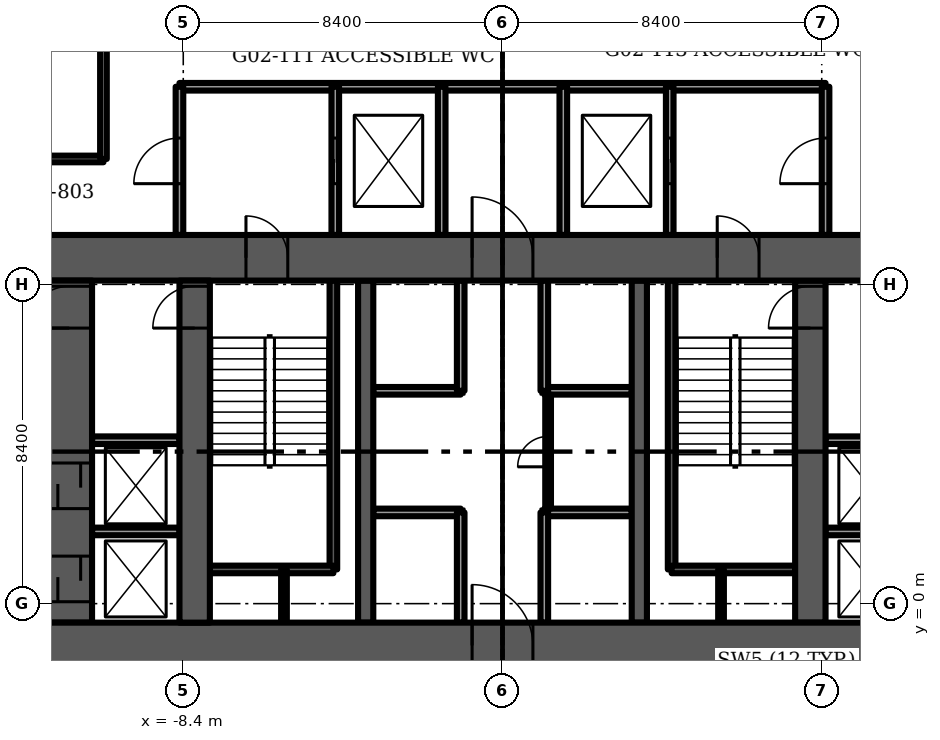
"""IFC4 building model, lengths in metres.
Left out: names, types, materials, properties, quantities, classifications, styles, units other than length and angle.
Written with IfcOpenShell. Run it as: python <this file> out.ifc"""

import sys

from ifc_helpers import new_model, si_unit, direction, frame, frame_2d, origin, place, context, subcontext, project, spatial, rectangle, extrude, element, fill, save


model = new_model("IFC4")
c1 = context("Model", 3, precision=1e-05, world=origin(), true_north=direction((0.0, 1.0)))
c2 = subcontext(c1, "Body", "Model", "MODEL_VIEW")
j1 = project(units=[si_unit("LENGTHUNIT", "METRE"), si_unit("PLANEANGLEUNIT", "RADIAN")], contexts=[c1])
p1 = place(None, origin())
s1 = spatial("IfcSite", under=j1, at=p1, CompositionType="ELEMENT")
p2 = place(p1, origin())
s2 = spatial("IfcBuilding", under=s1, at=p2, CompositionType="ELEMENT")
p3 = place(p2, frame((0.0, 0.0, 10.0)))
s3 = spatial("IfcBuildingStorey", under=s2, at=p3, CompositionType="ELEMENT", Elevation=10.0)
p4 = place(p3, frame((-12.0, -1.1, -0.3), z_axis=(0.0, 0.0, 1.0), x_axis=(1.0, 0.0, 0.0)))
e1 = element("IfcWall", 1, at=p4, inside=s3, PredefinedType="SHEAR", context=c2, shape_type="SweptSolid", body=[
    extrude(rectangle(XDim=24.0, YDim=1.2, at=frame_2d((12.0, 0.0))), origin(), (0.0, 0.0, 1.0), 4.5),
])
p5 = place(p4, frame((11.2, 0.0, 0.0)))
e2 = element("IfcOpeningElement", 2, at=p5, cuts=e1, PredefinedType="OPENING", context=c2, shape_type="SweptSolid", body=[
    extrude(rectangle(XDim=1.6, YDim=2.1, at=frame_2d((0.8, 1.05))), frame((0.0, 0.6, 0.0), z_axis=(0.0, -1.0, 0.0), x_axis=(1.0, 0.0, 0.0)), (0.0, 0.0, 1.0), 1.2),
])
p6 = place(p3, frame((-12.0, 9.1, -0.3), z_axis=(0.0, 0.0, 1.0), x_axis=(1.0, 0.0, 0.0)))
e3 = element("IfcWall", 3, at=p6, inside=s3, PredefinedType="SHEAR", context=c2, shape_type="SweptSolid", body=[
    extrude(rectangle(XDim=24.0, YDim=1.2, at=frame_2d((12.0, 0.0))), origin(), (0.0, 0.0, 1.0), 4.5),
])
p7 = place(p6, frame((11.2, 0.0, 0.0)))
e4 = element("IfcOpeningElement", 4, at=p7, cuts=e3, PredefinedType="OPENING", context=c2, shape_type="SweptSolid", body=[
    extrude(rectangle(XDim=1.6, YDim=2.1, at=frame_2d((0.8, 1.05))), frame((0.0, 0.6, 0.0), z_axis=(0.0, -1.0, 0.0), x_axis=(1.0, 0.0, 0.0)), (0.0, 0.0, 1.0), 1.2),
])
p8 = place(p6, frame((5.25, 0.0, 0.0)))
e5 = element("IfcOpeningElement", 5, at=p8, cuts=e3, PredefinedType="OPENING", context=c2, shape_type="SweptSolid", body=[
    extrude(rectangle(XDim=1.1, YDim=2.1, at=frame_2d((0.55, 1.05))), frame((0.0, 0.6, 0.0), z_axis=(0.0, -1.0, 0.0), x_axis=(1.0, 0.0, 0.0)), (0.0, 0.0, 1.0), 1.2),
])
p9 = place(p6, frame((17.65, 0.0, 0.0)))
e6 = element("IfcOpeningElement", 6, at=p9, cuts=e3, PredefinedType="OPENING", context=c2, shape_type="SweptSolid", body=[
    extrude(rectangle(XDim=1.1, YDim=2.1, at=frame_2d((0.55, 1.05))), frame((0.0, 0.6, 0.0), z_axis=(0.0, -1.0, 0.0), x_axis=(1.0, 0.0, 0.0)), (0.0, 0.0, 1.0), 1.2),
])
p10 = place(p3, frame((-8.1, -0.5, -0.3), z_axis=(0.0, 0.0, 1.0), x_axis=(0.0, 1.0, 0.0)))
e7 = element("IfcWall", 7, at=p10, inside=s3, PredefinedType="SHEAR", context=c2, shape_type="SweptSolid", body=[
    extrude(rectangle(XDim=9.0, YDim=0.8, at=frame_2d((4.5, 0.0))), origin(), (0.0, 0.0, 1.0), 4.5),
])
p11 = place(p10, frame((7.75, 0.0, 0.0)))
e8 = element("IfcOpeningElement", 8, at=p11, cuts=e7, PredefinedType="OPENING", context=c2, shape_type="SweptSolid", body=[
    extrude(rectangle(XDim=1.1, YDim=2.1, at=frame_2d((0.55, 1.05))), frame((0.0, 0.4, 0.0), z_axis=(0.0, -1.0, 0.0), x_axis=(1.0, 0.0, 0.0)), (0.0, 0.0, 1.0), 0.8),
])
p12 = place(p3, frame((8.1, -0.5, -0.3), z_axis=(0.0, 0.0, 1.0), x_axis=(0.0, 1.0, 0.0)))
e9 = element("IfcWall", 9, at=p12, inside=s3, PredefinedType="SHEAR", context=c2, shape_type="SweptSolid", body=[
    extrude(rectangle(XDim=9.0, YDim=0.8, at=frame_2d((4.5, 0.0))), origin(), (0.0, 0.0, 1.0), 4.5),
])
p13 = place(p12, frame((7.75, 0.0, 0.0)))
e10 = element("IfcOpeningElement", 10, at=p13, cuts=e9, PredefinedType="OPENING", context=c2, shape_type="SweptSolid", body=[
    extrude(rectangle(XDim=1.1, YDim=2.1, at=frame_2d((0.55, 1.05))), frame((0.0, 0.4, 0.0), z_axis=(0.0, -1.0, 0.0), x_axis=(1.0, 0.0, 0.0)), (0.0, 0.0, 1.0), 0.8),
])
for number, where, z_axis, x_axis in (
    (11, (-3.6, -0.5, -0.3), (0.0, 0.0, 1.0), (0.0, 1.0, 0.0)),
    (12, (3.6, -0.5, -0.3), (0.0, 0.0, 1.0), (0.0, 1.0, 0.0)),
):
    element("IfcWall", number, at=place(p3, frame(where, z_axis=z_axis, x_axis=x_axis)), inside=s3, PredefinedType="SHEAR", context=c2, shape_type="SweptSolid", body=[
        extrude(rectangle(XDim=9.0, YDim=0.4, at=frame_2d((4.5, 0.0))), origin(), (0.0, 0.0, 1.0), 4.5),
    ])
p14 = place(p3, frame((-11.4, -0.5, -0.3), z_axis=(0.0, 0.0, 1.0), x_axis=(0.0, 1.0, 0.0)))
e13 = element("IfcWall", 13, at=p14, inside=s3, PredefinedType="SHEAR", context=c2, shape_type="SweptSolid", body=[
    extrude(rectangle(XDim=9.0, YDim=1.2, at=frame_2d((4.5, 0.0))), origin(), (0.0, 0.0, 1.0), 4.5),
])
p15 = place(p14, frame((7.75, 0.0, 0.0)))
e14 = element("IfcOpeningElement", 14, at=p15, cuts=e13, PredefinedType="OPENING", context=c2, shape_type="SweptSolid", body=[
    extrude(rectangle(XDim=1.1, YDim=2.1, at=frame_2d((0.55, 1.05))), frame((0.0, 0.6, 0.0), z_axis=(0.0, -1.0, 0.0), x_axis=(1.0, 0.0, 0.0)), (0.0, 0.0, 1.0), 1.2),
])
p16 = place(p14, frame((0.55, 0.0, 0.0)))
e15 = element("IfcOpeningElement", 15, at=p16, cuts=e13, PredefinedType="OPENING", context=c2, shape_type="SweptSolid", body=[
    extrude(rectangle(XDim=1.2, YDim=2.1, at=frame_2d((0.6, 1.05))), frame((0.0, 0.6, 0.0), z_axis=(0.0, -1.0, 0.0), x_axis=(1.0, 0.0, 0.0)), (0.0, 0.0, 1.0), 1.2),
])
p17 = place(p14, frame((3.0, 0.0, 0.0)))
e16 = element("IfcOpeningElement", 16, at=p17, cuts=e13, PredefinedType="OPENING", context=c2, shape_type="SweptSolid", body=[
    extrude(rectangle(XDim=1.2, YDim=2.1, at=frame_2d((0.6, 1.05))), frame((0.0, 0.6, 0.0), z_axis=(0.0, -1.0, 0.0), x_axis=(1.0, 0.0, 0.0)), (0.0, 0.0, 1.0), 1.2),
])
for number, where, z_axis, x_axis in (
    (17, (-3.4, 2.4, 0.0), (0.0, 0.0, 1.0), (1.0, 0.0, 0.0)),
    (18, (-3.4, 5.6, 0.0), (0.0, 0.0, 1.0), (1.0, 0.0, 0.0)),
    (19, (1.1, 2.4, 0.0), (0.0, 0.0, 1.0), (1.0, 0.0, 0.0)),
    (20, (1.1, 5.6, 0.0), (0.0, 0.0, 1.0), (1.0, 0.0, 0.0)),
):
    element("IfcWall", number, at=place(p3, frame(where, z_axis=z_axis, x_axis=x_axis)), inside=s3, PredefinedType="PARTITIONING", context=c2, shape_type="SweptSolid", body=[
        extrude(rectangle(XDim=2.3, YDim=0.2, at=frame_2d((1.15, 0.0))), origin(), (0.0, 0.0, 1.0), 4.2),
    ])
for number, where, z_axis, x_axis in (
    (21, (-1.1, -0.5, 0.0), (0.0, 0.0, 1.0), (0.0, 1.0, 0.0)),
    (22, (1.1, -0.5, 0.0), (0.0, 0.0, 1.0), (0.0, 1.0, 0.0)),
    (23, (-1.1, 5.6, 0.0), (0.0, 0.0, 1.0), (0.0, 1.0, 0.0)),
    (24, (1.1, 5.6, 0.0), (0.0, 0.0, 1.0), (0.0, 1.0, 0.0)),
):
    element("IfcWall", number, at=place(p3, frame(where, z_axis=z_axis, x_axis=x_axis)), inside=s3, PredefinedType="PARTITIONING", context=c2, shape_type="SweptSolid", body=[
        extrude(rectangle(XDim=2.9, YDim=0.2, at=frame_2d((1.45, 0.0))), origin(), (0.0, 0.0, 1.0), 4.2),
    ])
p18 = place(p3, frame((-4.45, 0.9, -0.3), z_axis=(0.0, 0.0, 1.0), x_axis=(0.0, 1.0, 0.0)))
e25 = element("IfcWall", 25, at=p18, inside=s3, PredefinedType="SOLIDWALL", context=c2, shape_type="SweptSolid", body=[
    extrude(rectangle(XDim=7.6, YDim=0.2, at=frame_2d((3.8, 0.0))), origin(), (0.0, 0.0, 1.0), 4.5),
])
p19 = place(p3, frame((-7.7, 0.9, -0.3), z_axis=(0.0, 0.0, 1.0), x_axis=(1.0, 0.0, 0.0)))
e26 = element("IfcWall", 26, at=p19, inside=s3, PredefinedType="SOLIDWALL", context=c2, shape_type="SweptSolid", body=[
    extrude(rectangle(XDim=3.25, YDim=0.2, at=frame_2d((1.625, 0.0))), origin(), (0.0, 0.0, 1.0), 4.5),
])
p20 = place(p3, frame((-5.75, -0.5, 0.0), z_axis=(0.0, 0.0, 1.0), x_axis=(0.0, 1.0, 0.0)))
e27 = element("IfcWall", 27, at=p20, inside=s3, PredefinedType="PARTITIONING", context=c2, shape_type="SweptSolid", body=[
    extrude(rectangle(XDim=1.4, YDim=0.15, at=frame_2d((0.7, 0.0))), origin(), (0.0, 0.0, 1.0), 4.2),
])
p21 = place(p3, frame((4.45, 0.9, -0.3), z_axis=(0.0, 0.0, 1.0), x_axis=(0.0, 1.0, 0.0)))
e28 = element("IfcWall", 28, at=p21, inside=s3, PredefinedType="SOLIDWALL", context=c2, shape_type="SweptSolid", body=[
    extrude(rectangle(XDim=7.6, YDim=0.2, at=frame_2d((3.8, 0.0))), origin(), (0.0, 0.0, 1.0), 4.5),
])
p22 = place(p3, frame((4.45, 0.9, -0.3), z_axis=(0.0, 0.0, 1.0), x_axis=(1.0, 0.0, 0.0)))
e29 = element("IfcWall", 29, at=p22, inside=s3, PredefinedType="SOLIDWALL", context=c2, shape_type="SweptSolid", body=[
    extrude(rectangle(XDim=3.25, YDim=0.2, at=frame_2d((1.625, 0.0))), origin(), (0.0, 0.0, 1.0), 4.5),
])
p23 = place(p3, frame((5.75, -0.5, 0.0), z_axis=(0.0, 0.0, 1.0), x_axis=(0.0, 1.0, 0.0)))
e30 = element("IfcWall", 30, at=p23, inside=s3, PredefinedType="PARTITIONING", context=c2, shape_type="SweptSolid", body=[
    extrude(rectangle(XDim=1.4, YDim=0.15, at=frame_2d((0.7, 0.0))), origin(), (0.0, 0.0, 1.0), 4.2),
])
p24 = place(p3, frame((-8.5, 13.6, 0.0), z_axis=(0.0, 0.0, 1.0), x_axis=(1.0, 0.0, 0.0)))
e31 = element("IfcWall", 31, at=p24, inside=s3, PredefinedType="PARTITIONING", context=c2, shape_type="SweptSolid", body=[
    extrude(rectangle(XDim=17.0, YDim=0.2, at=frame_2d((8.5, 0.0))), origin(), (0.0, 0.0, 1.0), 4.2),
])
p25 = place(p3, frame((-8.5, 9.7, 0.0), z_axis=(0.0, 0.0, 1.0), x_axis=(0.0, 1.0, 0.0)))
e32 = element("IfcWall", 32, at=p25, inside=s3, PredefinedType="PARTITIONING", context=c2, shape_type="SweptSolid", body=[
    extrude(rectangle(XDim=3.9, YDim=0.2, at=frame_2d((1.95, 0.0))), origin(), (0.0, 0.0, 1.0), 4.2),
])
p26 = place(p25, frame((1.35, 0.0, 0.0)))
e33 = element("IfcOpeningElement", 33, at=p26, cuts=e32, PredefinedType="OPENING", context=c2, shape_type="SweptSolid", body=[
    extrude(rectangle(XDim=1.2, YDim=2.1, at=frame_2d((0.6, 1.05))), frame((0.0, 0.1, 0.0), z_axis=(0.0, -1.0, 0.0), x_axis=(1.0, 0.0, 0.0)), (0.0, 0.0, 1.0), 0.2),
])
p27 = place(p3, frame((8.5, 9.7, 0.0), z_axis=(0.0, 0.0, 1.0), x_axis=(0.0, 1.0, 0.0)))
e34 = element("IfcWall", 34, at=p27, inside=s3, PredefinedType="PARTITIONING", context=c2, shape_type="SweptSolid", body=[
    extrude(rectangle(XDim=3.9, YDim=0.2, at=frame_2d((1.95, 0.0))), origin(), (0.0, 0.0, 1.0), 4.2),
])
p28 = place(p27, frame((1.35, 0.0, 0.0)))
e35 = element("IfcOpeningElement", 35, at=p28, cuts=e34, PredefinedType="OPENING", context=c2, shape_type="SweptSolid", body=[
    extrude(rectangle(XDim=1.2, YDim=2.1, at=frame_2d((0.6, 1.05))), frame((0.0, 0.1, 0.0), z_axis=(0.0, -1.0, 0.0), x_axis=(1.0, 0.0, 0.0)), (0.0, 0.0, 1.0), 0.2),
])
p29 = place(p3, frame((-4.4, 9.7, 0.0), z_axis=(0.0, 0.0, 1.0), x_axis=(0.0, 1.0, 0.0)))
e36 = element("IfcWall", 36, at=p29, inside=s3, PredefinedType="PARTITIONING", context=c2, shape_type="SweptSolid", body=[
    extrude(rectangle(XDim=3.9, YDim=0.2, at=frame_2d((1.95, 0.0))), origin(), (0.0, 0.0, 1.0), 4.2),
])
p30 = place(p29, frame((1.35, 0.0, 0.0)))
e37 = element("IfcOpeningElement", 37, at=p30, cuts=e36, PredefinedType="OPENING", context=c2, shape_type="SweptSolid", body=[
    extrude(rectangle(XDim=1.2, YDim=2.1, at=frame_2d((0.6, 1.05))), frame((0.0, 0.1, 0.0), z_axis=(0.0, -1.0, 0.0), x_axis=(1.0, 0.0, 0.0)), (0.0, 0.0, 1.0), 0.2),
])
p31 = place(p3, frame((4.4, 9.7, 0.0), z_axis=(0.0, 0.0, 1.0), x_axis=(0.0, 1.0, 0.0)))
e38 = element("IfcWall", 38, at=p31, inside=s3, PredefinedType="PARTITIONING", context=c2, shape_type="SweptSolid", body=[
    extrude(rectangle(XDim=3.9, YDim=0.2, at=frame_2d((1.95, 0.0))), origin(), (0.0, 0.0, 1.0), 4.2),
])
p32 = place(p31, frame((1.35, 0.0, 0.0)))
e39 = element("IfcOpeningElement", 39, at=p32, cuts=e38, PredefinedType="OPENING", context=c2, shape_type="SweptSolid", body=[
    extrude(rectangle(XDim=1.2, YDim=2.1, at=frame_2d((0.6, 1.05))), frame((0.0, 0.1, 0.0), z_axis=(0.0, -1.0, 0.0), x_axis=(1.0, 0.0, 0.0)), (0.0, 0.0, 1.0), 0.2),
])
for number, where, z_axis, x_axis in (
    (40, (-1.6, 9.7, 0.0), (0.0, 0.0, 1.0), (0.0, 1.0, 0.0)),
    (41, (1.6, 9.7, 0.0), (0.0, 0.0, 1.0), (0.0, 1.0, 0.0)),
):
    element("IfcWall", number, at=place(p3, frame(where, z_axis=z_axis, x_axis=x_axis)), inside=s3, PredefinedType="PARTITIONING", context=c2, shape_type="SweptSolid", body=[
        extrude(rectangle(XDim=3.9, YDim=0.2, at=frame_2d((1.95, 0.0))), origin(), (0.0, 0.0, 1.0), 4.2),
    ])
p33 = place(p3, frame((1.2, 2.5, 0.0), z_axis=(0.0, 0.0, 1.0), x_axis=(0.0, 1.0, 0.0)))
e42 = element("IfcWall", 42, at=p33, inside=s3, PredefinedType="PARTITIONING", context=c2, shape_type="SweptSolid", body=[
    extrude(rectangle(XDim=3.0, YDim=0.15, at=frame_2d((1.5, 0.0))), origin(), (0.0, 0.0, 1.0), 4.2),
])
p34 = place(p33, frame((1.1, 0.0, 0.0)))
e43 = element("IfcOpeningElement", 43, at=p34, cuts=e42, PredefinedType="OPENING", context=c2, shape_type="SweptSolid", body=[
    extrude(rectangle(XDim=0.8, YDim=2.1, at=frame_2d((0.4, 1.05))), frame((0.0, 0.075, 0.0), z_axis=(0.0, -1.0, 0.0), x_axis=(1.0, 0.0, 0.0)), (0.0, 0.0, 1.0), 0.15),
])
for number, where, z_axis, x_axis in (
    (44, (-10.8, 1.9, 0.0), (0.0, 0.0, 1.0), (1.0, 0.0, 0.0)),
    (45, (-10.8, 4.3, 0.0), (0.0, 0.0, 1.0), (1.0, 0.0, 0.0)),
    (46, (8.5, 1.9, 0.0), (0.0, 0.0, 1.0), (1.0, 0.0, 0.0)),
    (47, (8.5, 4.3, 0.0), (0.0, 0.0, 1.0), (1.0, 0.0, 0.0)),
):
    element("IfcWall", number, at=place(p3, frame(where, z_axis=z_axis, x_axis=x_axis)), inside=s3, PredefinedType="PARTITIONING", context=c2, shape_type="SweptSolid", body=[
        extrude(rectangle(XDim=2.3, YDim=0.2, at=frame_2d((1.15, 0.0))), origin(), (0.0, 0.0, 1.0), 4.2),
    ])
p35 = place(p3, frame((-14.0, 11.7, 0.0), z_axis=(0.0, 0.0, 1.0), x_axis=(1.0, 0.0, 0.0)))
e48 = element("IfcWall", 48, at=p35, inside=s3, PredefinedType="PARTITIONING", context=c2, shape_type="SweptSolid", body=[
    extrude(rectangle(XDim=3.5, YDim=0.175, at=frame_2d((1.75, 0.0))), origin(), (0.0, 0.0, 1.0), 4.2),
])
p36 = place(p3, frame((-10.5, 11.7, 0.0), z_axis=(0.0, 0.0, 1.0), x_axis=(0.0, 1.0, 0.0)))
e49 = element("IfcWall", 49, at=p36, inside=s3, PredefinedType="PARTITIONING", context=c2, shape_type="SweptSolid", body=[
    extrude(rectangle(XDim=3.9, YDim=0.175, at=frame_2d((1.95, 0.0))), origin(), (0.0, 0.0, 1.0), 4.2),
])
p37 = place(p5, origin())
e50 = element("IfcDoor", 50, at=p37, inside=s3, OperationType="DOUBLE_DOOR_SINGLE_SWING", PredefinedType="DOOR", context=c2, shape_type="SweptSolid", body=[
    extrude(rectangle(XDim=1.6, YDim=2.1, at=frame_2d((0.8, 1.05))), frame((0.0, 0.025, 0.0), z_axis=(0.0, -1.0, 0.0), x_axis=(1.0, 0.0, 0.0)), (0.0, 0.0, 1.0), 0.05),
])
fill(e2, e50)
p38 = place(p7, origin())
e51 = element("IfcDoor", 51, at=p38, inside=s3, OperationType="DOUBLE_DOOR_SINGLE_SWING", PredefinedType="DOOR", context=c2, shape_type="SweptSolid", body=[
    extrude(rectangle(XDim=1.6, YDim=2.1, at=frame_2d((0.8, 1.05))), frame((0.0, 0.025, 0.0), z_axis=(0.0, -1.0, 0.0), x_axis=(1.0, 0.0, 0.0)), (0.0, 0.0, 1.0), 0.05),
])
fill(e4, e51)
p39 = place(p8, origin())
e52 = element("IfcDoor", 52, at=p39, inside=s3, OperationType="SINGLE_SWING_LEFT", PredefinedType="DOOR", context=c2, shape_type="SweptSolid", body=[
    extrude(rectangle(XDim=1.1, YDim=2.1, at=frame_2d((0.55, 1.05))), frame((0.0, 0.025, 0.0), z_axis=(0.0, -1.0, 0.0), x_axis=(1.0, 0.0, 0.0)), (0.0, 0.0, 1.0), 0.05),
])
fill(e5, e52)
p40 = place(p11, origin())
e53 = element("IfcDoor", 53, at=p40, inside=s3, OperationType="SINGLE_SWING_RIGHT", PredefinedType="DOOR", context=c2, shape_type="SweptSolid", body=[
    extrude(rectangle(XDim=1.1, YDim=2.1, at=frame_2d((0.55, 1.05))), frame((0.0, 0.025, 0.0), z_axis=(0.0, -1.0, 0.0), x_axis=(1.0, 0.0, 0.0)), (0.0, 0.0, 1.0), 0.05),
])
fill(e8, e53)
p41 = place(p9, origin())
e54 = element("IfcDoor", 54, at=p41, inside=s3, OperationType="SINGLE_SWING_RIGHT", PredefinedType="DOOR", context=c2, shape_type="SweptSolid", body=[
    extrude(rectangle(XDim=1.1, YDim=2.1, at=frame_2d((0.55, 1.05))), frame((0.0, 0.025, 0.0), z_axis=(0.0, -1.0, 0.0), x_axis=(1.0, 0.0, 0.0)), (0.0, 0.0, 1.0), 0.05),
])
fill(e6, e54)
p42 = place(p13, origin())
e55 = element("IfcDoor", 55, at=p42, inside=s3, OperationType="SINGLE_SWING_LEFT", PredefinedType="DOOR", context=c2, shape_type="SweptSolid", body=[
    extrude(rectangle(XDim=1.1, YDim=2.1, at=frame_2d((0.55, 1.05))), frame((0.0, 0.025, 0.0), z_axis=(0.0, -1.0, 0.0), x_axis=(1.0, 0.0, 0.0)), (0.0, 0.0, 1.0), 0.05),
])
fill(e10, e55)
p43 = place(p30, origin())
e56 = element("IfcDoor", 56, at=p43, inside=s3, OperationType="SLIDING_TO_LEFT", PredefinedType="DOOR", context=c2, shape_type="SweptSolid", body=[
    extrude(rectangle(XDim=1.2, YDim=2.1, at=frame_2d((0.6, 1.05))), frame((0.0, 0.025, 0.0), z_axis=(0.0, -1.0, 0.0), x_axis=(1.0, 0.0, 0.0)), (0.0, 0.0, 1.0), 0.05),
])
fill(e37, e56)
p44 = place(p26, origin())
e57 = element("IfcDoor", 57, at=p44, inside=s3, OperationType="SINGLE_SWING_LEFT", PredefinedType="DOOR", context=c2, shape_type="SweptSolid", body=[
    extrude(rectangle(XDim=1.2, YDim=2.1, at=frame_2d((0.6, 1.05))), frame((0.0, 0.025, 0.0), z_axis=(0.0, -1.0, 0.0), x_axis=(1.0, 0.0, 0.0)), (0.0, 0.0, 1.0), 0.05),
])
fill(e33, e57)
p45 = place(p32, origin())
e58 = element("IfcDoor", 58, at=p45, inside=s3, OperationType="SLIDING_TO_LEFT", PredefinedType="DOOR", context=c2, shape_type="SweptSolid", body=[
    extrude(rectangle(XDim=1.2, YDim=2.1, at=frame_2d((0.6, 1.05))), frame((0.0, 0.025, 0.0), z_axis=(0.0, -1.0, 0.0), x_axis=(1.0, 0.0, 0.0)), (0.0, 0.0, 1.0), 0.05),
])
fill(e39, e58)
p46 = place(p28, origin())
e59 = element("IfcDoor", 59, at=p46, inside=s3, OperationType="SINGLE_SWING_LEFT", PredefinedType="DOOR", context=c2, shape_type="SweptSolid", body=[
    extrude(rectangle(XDim=1.2, YDim=2.1, at=frame_2d((0.6, 1.05))), frame((0.0, 0.025, 0.0), z_axis=(0.0, -1.0, 0.0), x_axis=(1.0, 0.0, 0.0)), (0.0, 0.0, 1.0), 0.05),
])
fill(e35, e59)
p47 = place(p34, origin())
e60 = element("IfcDoor", 60, at=p47, inside=s3, OperationType="SINGLE_SWING_RIGHT", PredefinedType="DOOR", context=c2, shape_type="SweptSolid", body=[
    extrude(rectangle(XDim=0.8, YDim=2.1, at=frame_2d((0.4, 1.05))), frame((0.0, 0.025, 0.0), z_axis=(0.0, -1.0, 0.0), x_axis=(1.0, 0.0, 0.0)), (0.0, 0.0, 1.0), 0.05),
])
fill(e43, e60)
p48 = place(p15, origin())
e61 = element("IfcDoor", 61, at=p48, inside=s3, OperationType="SINGLE_SWING_LEFT", PredefinedType="DOOR", context=c2, shape_type="SweptSolid", body=[
    extrude(rectangle(XDim=1.1, YDim=2.1, at=frame_2d((0.55, 1.05))), frame((0.0, 0.025, 0.0), z_axis=(0.0, -1.0, 0.0), x_axis=(1.0, 0.0, 0.0)), (0.0, 0.0, 1.0), 0.05),
])
fill(e14, e61)
p49 = place(p16, origin())
e62 = element("IfcDoor", 62, at=p49, inside=s3, OperationType="SLIDING_TO_LEFT", PredefinedType="DOOR", context=c2, shape_type="SweptSolid", body=[
    extrude(rectangle(XDim=1.2, YDim=2.1, at=frame_2d((0.6, 1.05))), frame((0.0, 0.025, 0.0), z_axis=(0.0, -1.0, 0.0), x_axis=(1.0, 0.0, 0.0)), (0.0, 0.0, 1.0), 0.05),
])
fill(e15, e62)
p50 = place(p17, origin())
e63 = element("IfcDoor", 63, at=p50, inside=s3, OperationType="SLIDING_TO_LEFT", PredefinedType="DOOR", context=c2, shape_type="SweptSolid", body=[
    extrude(rectangle(XDim=1.2, YDim=2.1, at=frame_2d((0.6, 1.05))), frame((0.0, 0.025, 0.0), z_axis=(0.0, -1.0, 0.0), x_axis=(1.0, 0.0, 0.0)), (0.0, 0.0, 1.0), 0.05),
])
fill(e16, e63)
save(model, sys.argv[1])
